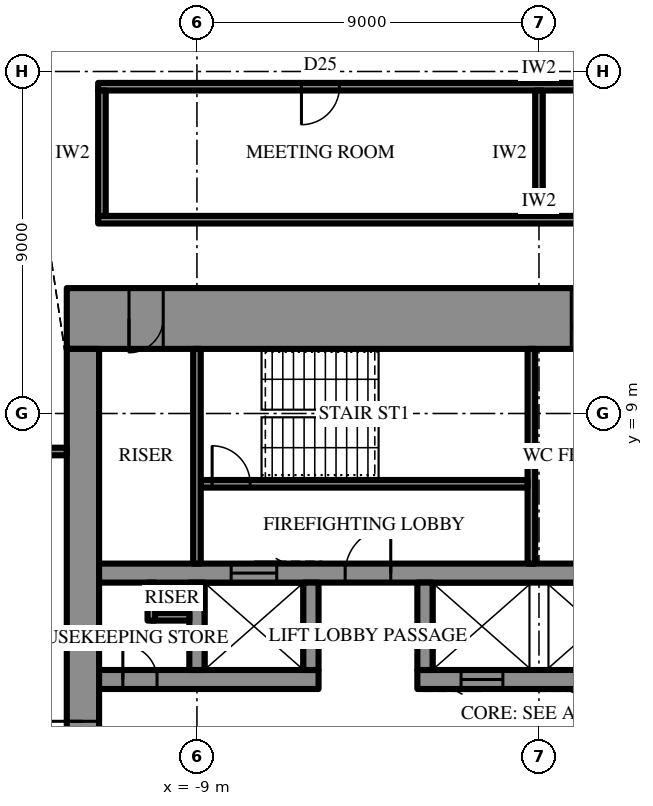
"""IFC4 building model, lengths in metres.
Left out: names, types, materials, properties, quantities, classifications, styles, units other than length and angle.
Written with IfcOpenShell. Run it as: python <this file> out.ifc"""

import sys

from ifc_helpers import new_model, si_unit, direction, frame, frame_2d, origin, place, context, subcontext, project, spatial, rectangle, extrude, element, fill, save


model = new_model("IFC4")
c1 = context("Model", 3, precision=1e-05, world=origin(), true_north=direction((0.0, 1.0)))
c2 = subcontext(c1, "Body", "Model", "MODEL_VIEW")
j1 = project(units=[si_unit("LENGTHUNIT", "METRE"), si_unit("PLANEANGLEUNIT", "RADIAN")], contexts=[c1])
p1 = place(None, origin())
s1 = spatial("IfcSite", under=j1, at=p1, CompositionType="ELEMENT")
p2 = place(p1, origin())
s2 = spatial("IfcBuilding", under=s1, at=p2, CompositionType="ELEMENT")
p3 = place(p2, frame((0.0, 0.0, 345.1)))
s3 = spatial("IfcBuildingStorey", under=s2, at=p3, CompositionType="ELEMENT", Elevation=345.1)
p4 = place(p3, frame((-12.425, 11.5, 0.0), z_axis=(0.0, 0.0, 1.0), x_axis=(1.0, 0.0, 0.0)))
e1 = element("IfcWall", 1, at=p4, inside=s3, PredefinedType="SHEAR", context=c2, shape_type="SweptSolid", body=[
    extrude(rectangle(XDim=24.85, YDim=1.6, at=frame_2d((12.425, 0.0))), origin(), (0.0, 0.0, 1.0), 4.2),
])
p5 = place(p4, frame((13.275, 0.0, 0.0)))
e2 = element("IfcOpeningElement", 2, at=p5, cuts=e1, PredefinedType="OPENING", context=c2, shape_type="SweptSolid", body=[
    extrude(rectangle(XDim=0.9, YDim=2.2, at=frame_2d((0.45, 1.1))), frame((0.0, 0.81, 0.0), z_axis=(0.0, -1.0, 0.0), x_axis=(1.0, 0.0, 0.0)), (0.0, 0.0, 1.0), 1.62),
])
p6 = place(p4, frame((16.275, 0.0, 0.0)))
e3 = element("IfcOpeningElement", 3, at=p6, cuts=e1, PredefinedType="OPENING", context=c2, shape_type="SweptSolid", body=[
    extrude(rectangle(XDim=0.9, YDim=2.2, at=frame_2d((0.45, 1.1))), frame((0.0, 0.81, 0.0), z_axis=(0.0, -1.0, 0.0), x_axis=(1.0, 0.0, 0.0)), (0.0, 0.0, 1.0), 1.62),
])
p7 = place(p4, frame((19.325, 0.0, 0.0)))
e4 = element("IfcOpeningElement", 4, at=p7, cuts=e1, PredefinedType="OPENING", context=c2, shape_type="SweptSolid", body=[
    extrude(rectangle(XDim=1.0, YDim=2.2, at=frame_2d((0.5, 1.1))), frame((0.0, 0.81, 0.0), z_axis=(0.0, -1.0, 0.0), x_axis=(1.0, 0.0, 0.0)), (0.0, 0.0, 1.0), 1.62),
])
p8 = place(p4, frame((1.637, 0.0, 0.0)))
e5 = element("IfcOpeningElement", 5, at=p8, cuts=e1, PredefinedType="OPENING", context=c2, shape_type="SweptSolid", body=[
    extrude(rectangle(XDim=0.9, YDim=2.2, at=frame_2d((0.45, 1.1))), frame((0.0, 0.81, 0.0), z_axis=(0.0, -1.0, 0.0), x_axis=(1.0, 0.0, 0.0)), (0.0, 0.0, 1.0), 1.62),
])
p9 = place(p4, frame((22.312, 0.0, 0.0)))
e6 = element("IfcOpeningElement", 6, at=p9, cuts=e1, PredefinedType="OPENING", context=c2, shape_type="SweptSolid", body=[
    extrude(rectangle(XDim=0.9, YDim=2.2, at=frame_2d((0.45, 1.1))), frame((0.0, 0.81, 0.0), z_axis=(0.0, -1.0, 0.0), x_axis=(1.0, 0.0, 0.0)), (0.0, 0.0, 1.0), 1.62),
])
p10 = place(p3, frame((-12.0, 10.7, 0.0), z_axis=(0.0, 0.0, 1.0), x_axis=(0.0, -1.0, 0.0)))
e7 = element("IfcWall", 7, at=p10, inside=s3, PredefinedType="SHEAR", context=c2, shape_type="SweptSolid", body=[
    extrude(rectangle(XDim=21.4, YDim=0.85, at=frame_2d((10.7, 0.0))), origin(), (0.0, 0.0, 1.0), 4.2),
])
p11 = place(p10, frame((9.8, 0.0, 0.0)))
e8 = element("IfcOpeningElement", 8, at=p11, cuts=e7, PredefinedType="OPENING", context=c2, shape_type="SweptSolid", body=[
    extrude(rectangle(XDim=1.8, YDim=2.4, at=frame_2d((0.9, 1.2))), frame((0.0, 0.435, 0.0), z_axis=(0.0, -1.0, 0.0), x_axis=(1.0, 0.0, 0.0)), (0.0, 0.0, 1.0), 0.87),
])
p12 = place(p3, frame((-11.575, 2.0, 0.0), z_axis=(0.0, 0.0, 1.0), x_axis=(1.0, 0.0, 0.0)))
e9 = element("IfcWall", 9, at=p12, inside=s3, PredefinedType="SHEAR", context=c2, shape_type="SweptSolid", body=[
    extrude(rectangle(XDim=5.775, YDim=0.5, at=frame_2d((2.887, 0.0))), origin(), (0.0, 0.0, 1.0), 4.2),
])
p13 = place(p12, frame((0.625, 0.0, 0.0)))
e10 = element("IfcOpeningElement", 10, at=p13, cuts=e9, PredefinedType="OPENING", context=c2, shape_type="SweptSolid", body=[
    extrude(rectangle(XDim=0.9, YDim=2.2, at=frame_2d((0.45, 1.1))), frame((0.0, 0.26, 0.0), z_axis=(0.0, -1.0, 0.0), x_axis=(1.0, 0.0, 0.0)), (0.0, 0.0, 1.0), 0.52),
])
p14 = place(p3, frame((-3.2, 2.0, 0.0), z_axis=(0.0, 0.0, 1.0), x_axis=(1.0, 0.0, 0.0)))
e11 = element("IfcWall", 11, at=p14, inside=s3, PredefinedType="SHEAR", context=c2, shape_type="SweptSolid", body=[
    extrude(rectangle(XDim=14.775, YDim=0.5, at=frame_2d((7.387, 0.0))), origin(), (0.0, 0.0, 1.0), 4.2),
])
p15 = place(p14, frame((13.25, 0.0, 0.0)))
e12 = element("IfcOpeningElement", 12, at=p15, cuts=e11, PredefinedType="OPENING", context=c2, shape_type="SweptSolid", body=[
    extrude(rectangle(XDim=0.9, YDim=2.2, at=frame_2d((0.45, 1.1))), frame((0.0, 0.26, 0.0), z_axis=(0.0, -1.0, 0.0), x_axis=(1.0, 0.0, 0.0)), (0.0, 0.0, 1.0), 0.52),
])
p16 = place(p14, frame((1.15, 0.0, 0.0)))
e13 = element("IfcOpeningElement", 13, at=p16, cuts=e11, PredefinedType="OPENING", context=c2, shape_type="SweptSolid", body=[
    extrude(rectangle(XDim=1.1, YDim=2.2, at=frame_2d((0.55, 1.1))), frame((0.0, 0.26, 0.0), z_axis=(0.0, -1.0, 0.0), x_axis=(1.0, 0.0, 0.0)), (0.0, 0.0, 1.0), 0.52),
])
p17 = place(p14, frame((4.15, 0.0, 0.0)))
e14 = element("IfcOpeningElement", 14, at=p17, cuts=e11, PredefinedType="OPENING", context=c2, shape_type="SweptSolid", body=[
    extrude(rectangle(XDim=1.1, YDim=2.2, at=frame_2d((0.55, 1.1))), frame((0.0, 0.26, 0.0), z_axis=(0.0, -1.0, 0.0), x_axis=(1.0, 0.0, 0.0)), (0.0, 0.0, 1.0), 0.52),
])
p18 = place(p14, frame((7.15, 0.0, 0.0)))
e15 = element("IfcOpeningElement", 15, at=p18, cuts=e11, PredefinedType="OPENING", context=c2, shape_type="SweptSolid", body=[
    extrude(rectangle(XDim=1.1, YDim=2.2, at=frame_2d((0.55, 1.1))), frame((0.0, 0.26, 0.0), z_axis=(0.0, -1.0, 0.0), x_axis=(1.0, 0.0, 0.0)), (0.0, 0.0, 1.0), 0.52),
])
p19 = place(p14, frame((10.15, 0.0, 0.0)))
e16 = element("IfcOpeningElement", 16, at=p19, cuts=e11, PredefinedType="OPENING", context=c2, shape_type="SweptSolid", body=[
    extrude(rectangle(XDim=1.1, YDim=2.2, at=frame_2d((0.55, 1.1))), frame((0.0, 0.26, 0.0), z_axis=(0.0, -1.0, 0.0), x_axis=(1.0, 0.0, 0.0)), (0.0, 0.0, 1.0), 0.52),
])
p20 = place(p3, frame((-11.575, 4.8, 0.0), z_axis=(0.0, 0.0, 1.0), x_axis=(1.0, 0.0, 0.0)))
e17 = element("IfcWall", 17, at=p20, inside=s3, PredefinedType="SHEAR", context=c2, shape_type="SweptSolid", body=[
    extrude(rectangle(XDim=23.15, YDim=0.5, at=frame_2d((11.575, 0.0))), origin(), (0.0, 0.0, 1.0), 4.2),
])
p21 = place(p20, frame((6.475, 0.0, 0.0)))
e18 = element("IfcOpeningElement", 18, at=p21, cuts=e17, PredefinedType="OPENING", context=c2, shape_type="SweptSolid", body=[
    extrude(rectangle(XDim=1.2, YDim=2.2, at=frame_2d((0.6, 1.1))), frame((0.0, 0.26, 0.0), z_axis=(0.0, -1.0, 0.0), x_axis=(1.0, 0.0, 0.0)), (0.0, 0.0, 1.0), 0.52),
])
p22 = place(p20, frame((3.475, 0.0, 0.0)))
e19 = element("IfcOpeningElement", 19, at=p22, cuts=e17, PredefinedType="OPENING", context=c2, shape_type="SweptSolid", body=[
    extrude(rectangle(XDim=1.2, YDim=2.2, at=frame_2d((0.6, 1.1))), frame((0.0, 0.26, 0.0), z_axis=(0.0, -1.0, 0.0), x_axis=(1.0, 0.0, 0.0)), (0.0, 0.0, 1.0), 0.52),
])
for number, where, z_axis, x_axis in (
    (20, (-9.0, 2.25, 0.0), (0.0, 0.0, 1.0), (0.0, 1.0, 0.0)),
    (21, (-6.0, 2.25, 0.0), (0.0, 0.0, 1.0), (0.0, 1.0, 0.0)),
    (22, (-3.0, 2.25, 0.0), (0.0, 0.0, 1.0), (0.0, 1.0, 0.0)),
):
    element("IfcWall", number, at=place(p3, frame(where, z_axis=z_axis, x_axis=x_axis)), inside=s3, PredefinedType="SHEAR", context=c2, shape_type="SweptSolid", body=[
        extrude(rectangle(XDim=2.3, YDim=0.4, at=frame_2d((1.15, 0.0))), origin(), (0.0, 0.0, 1.0), 4.2),
    ])
p23 = place(p3, frame((-0.2, 5.05, 0.0), z_axis=(0.0, 0.0, 1.0), x_axis=(0.0, 1.0, 0.0)))
e23 = element("IfcWall", 23, at=p23, inside=s3, PredefinedType="SHEAR", context=c2, shape_type="SweptSolid", body=[
    extrude(rectangle(XDim=5.65, YDim=0.2, at=frame_2d((2.825, 0.0))), origin(), (0.0, 0.0, 1.0), 4.2),
])
p24 = place(p3, frame((-8.9, 7.15, 0.0), z_axis=(0.0, 0.0, 1.0), x_axis=(1.0, 0.0, 0.0)))
e24 = element("IfcWall", 24, at=p24, inside=s3, PredefinedType="SHEAR", context=c2, shape_type="SweptSolid", body=[
    extrude(rectangle(XDim=8.6, YDim=0.2, at=frame_2d((4.3, 0.0))), origin(), (0.0, 0.0, 1.0), 4.2),
])
p25 = place(p24, frame((0.3, 0.0, 0.0)))
e25 = element("IfcOpeningElement", 25, at=p25, cuts=e24, PredefinedType="OPENING", context=c2, shape_type="SweptSolid", body=[
    extrude(rectangle(XDim=1.0, YDim=2.2, at=frame_2d((0.5, 1.1))), frame((0.0, 0.11, 0.0), z_axis=(0.0, -1.0, 0.0), x_axis=(1.0, 0.0, 0.0)), (0.0, 0.0, 1.0), 0.22),
])
p26 = place(p3, frame((-9.0, 5.05, 0.0), z_axis=(0.0, 0.0, 1.0), x_axis=(0.0, 1.0, 0.0)))
e26 = element("IfcWall", 26, at=p26, inside=s3, PredefinedType="PARTITIONING", context=c2, shape_type="SweptSolid", body=[
    extrude(rectangle(XDim=5.65, YDim=0.2, at=frame_2d((2.825, 0.0))), origin(), (0.0, 0.0, 1.0), 4.0),
])
for number, where, z_axis, x_axis in (
    (27, (-10.2, 3.65, 0.0), (0.0, 0.0, 1.0), (1.0, 0.0, 0.0)),
    (28, (-10.2, 3.55, 0.0), (0.0, 0.0, 1.0), (0.0, 1.0, 0.0)),
):
    element("IfcWall", number, at=place(p3, frame(where, z_axis=z_axis, x_axis=x_axis)), inside=s3, PredefinedType="PARTITIONING", context=c2, shape_type="SweptSolid", body=[
        extrude(rectangle(XDim=1.0, YDim=0.2, at=frame_2d((0.5, 0.0))), origin(), (0.0, 0.0, 1.0), 4.0),
    ])
p27 = place(p3, frame((-11.6, 14.1, 0.0), z_axis=(0.0, 0.0, 1.0), x_axis=(1.0, 0.0, 0.0)))
e29 = element("IfcWall", 29, at=p27, inside=s3, PredefinedType="PARTITIONING", context=c2, shape_type="SweptSolid", body=[
    extrude(rectangle(XDim=23.2, YDim=0.2, at=frame_2d((11.6, 0.0))), origin(), (0.0, 0.0, 1.0), 4.0),
])
p28 = place(p3, frame((-11.6, 17.6, 0.0), z_axis=(0.0, 0.0, 1.0), x_axis=(1.0, 0.0, 0.0)))
e30 = element("IfcWall", 30, at=p28, inside=s3, PredefinedType="PARTITIONING", context=c2, shape_type="SweptSolid", body=[
    extrude(rectangle(XDim=23.2, YDim=0.2, at=frame_2d((11.6, 0.0))), origin(), (0.0, 0.0, 1.0), 4.0),
])
p29 = place(p28, frame((5.35, 0.0, 0.0)))
e31 = element("IfcOpeningElement", 31, at=p29, cuts=e30, PredefinedType="OPENING", context=c2, shape_type="SweptSolid", body=[
    extrude(rectangle(XDim=1.0, YDim=2.2, at=frame_2d((0.5, 1.1))), frame((0.0, 0.11, 0.0), z_axis=(0.0, -1.0, 0.0), x_axis=(1.0, 0.0, 0.0)), (0.0, 0.0, 1.0), 0.22),
])
p30 = place(p28, frame((16.85, 0.0, 0.0)))
e32 = element("IfcOpeningElement", 32, at=p30, cuts=e30, PredefinedType="OPENING", context=c2, shape_type="SweptSolid", body=[
    extrude(rectangle(XDim=1.0, YDim=2.2, at=frame_2d((0.5, 1.1))), frame((0.0, 0.11, 0.0), z_axis=(0.0, -1.0, 0.0), x_axis=(1.0, 0.0, 0.0)), (0.0, 0.0, 1.0), 0.22),
])
p31 = place(p3, frame((-11.5, 14.2, 0.0), z_axis=(0.0, 0.0, 1.0), x_axis=(0.0, 1.0, 0.0)))
e33 = element("IfcWall", 33, at=p31, inside=s3, PredefinedType="PARTITIONING", context=c2, shape_type="SweptSolid", body=[
    extrude(rectangle(XDim=3.3, YDim=0.2, at=frame_2d((1.65, 0.0))), origin(), (0.0, 0.0, 1.0), 4.0),
])
p32 = place(p3, frame((0.0, 14.2, 0.0), z_axis=(0.0, 0.0, 1.0), x_axis=(0.0, 1.0, 0.0)))
e34 = element("IfcWall", 34, at=p32, inside=s3, PredefinedType="PARTITIONING", context=c2, shape_type="SweptSolid", body=[
    extrude(rectangle(XDim=3.3, YDim=0.2, at=frame_2d((1.65, 0.0))), origin(), (0.0, 0.0, 1.0), 2.992),
])
p33 = place(p3, frame((-12.425, 8.0, 0.0), z_axis=(0.0, 0.0, 1.0), x_axis=(-1.0, 0.0, 0.0)))
e35 = element("IfcWall", 35, at=p33, inside=s3, PredefinedType="PARTITIONING", context=c2, shape_type="SweptSolid", body=[
    extrude(rectangle(XDim=13.59, YDim=0.2, at=frame_2d((6.795, 0.0))), origin(), (0.0, 0.0, 1.0), 4.0),
])
p34 = place(p33, frame((0.859, 0.0, 0.0)))
e36 = element("IfcOpeningElement", 36, at=p34, cuts=e35, PredefinedType="OPENING", context=c2, shape_type="SweptSolid", body=[
    extrude(rectangle(XDim=1.0, YDim=2.2, at=frame_2d((0.5, 1.1))), frame((0.0, 0.11, 0.0), z_axis=(0.0, -1.0, 0.0), x_axis=(1.0, 0.0, 0.0)), (0.0, 0.0, 1.0), 0.22),
])
p35 = place(p11, frame((1.8, 0.0, 0.0), z_axis=(0.0, 0.0, 1.0), x_axis=(-1.0, 0.0, 0.0)))
e37 = element("IfcDoor", 37, at=p35, inside=s3, OperationType="DOUBLE_DOOR_SINGLE_SWING", PredefinedType="DOOR", context=c2, shape_type="SweptSolid", body=[
    extrude(rectangle(XDim=1.8, YDim=2.4, at=frame_2d((0.9, 1.2))), frame((0.0, 0.025, 0.0), z_axis=(0.0, -1.0, 0.0), x_axis=(1.0, 0.0, 0.0)), (0.0, 0.0, 1.0), 0.05),
])
fill(e8, e37)
p36 = place(p21, origin())
e38 = element("IfcDoor", 38, at=p36, inside=s3, OperationType="SINGLE_SWING_LEFT", PredefinedType="DOOR", context=c2, shape_type="SweptSolid", body=[
    extrude(rectangle(XDim=1.2, YDim=2.2, at=frame_2d((0.6, 1.1))), frame((0.0, 0.025, 0.0), z_axis=(0.0, -1.0, 0.0), x_axis=(1.0, 0.0, 0.0)), (0.0, 0.0, 1.0), 0.05),
])
fill(e18, e38)
p37 = place(p25, origin())
e39 = element("IfcDoor", 39, at=p37, inside=s3, OperationType="SINGLE_SWING_RIGHT", PredefinedType="DOOR", context=c2, shape_type="SweptSolid", body=[
    extrude(rectangle(XDim=1.0, YDim=2.2, at=frame_2d((0.5, 1.1))), frame((0.0, 0.025, 0.0), z_axis=(0.0, -1.0, 0.0), x_axis=(1.0, 0.0, 0.0)), (0.0, 0.0, 1.0), 0.05),
])
fill(e25, e39)
p38 = place(p5, frame((0.9, 0.0, 0.0), z_axis=(0.0, 0.0, 1.0), x_axis=(-1.0, 0.0, 0.0)))
e40 = element("IfcDoor", 40, at=p38, inside=s3, OperationType="SINGLE_SWING_RIGHT", PredefinedType="DOOR", context=c2, shape_type="SweptSolid", body=[
    extrude(rectangle(XDim=0.9, YDim=2.2, at=frame_2d((0.45, 1.1))), frame((0.0, 0.025, 0.0), z_axis=(0.0, -1.0, 0.0), x_axis=(1.0, 0.0, 0.0)), (0.0, 0.0, 1.0), 0.05),
])
fill(e2, e40)
p39 = place(p8, frame((0.9, 0.0, 0.0), z_axis=(0.0, 0.0, 1.0), x_axis=(-1.0, 0.0, 0.0)))
e41 = element("IfcDoor", 41, at=p39, inside=s3, OperationType="SINGLE_SWING_LEFT", PredefinedType="DOOR", context=c2, shape_type="SweptSolid", body=[
    extrude(rectangle(XDim=0.9, YDim=2.2, at=frame_2d((0.45, 1.1))), frame((0.0, 0.025, 0.0), z_axis=(0.0, -1.0, 0.0), x_axis=(1.0, 0.0, 0.0)), (0.0, 0.0, 1.0), 0.05),
])
fill(e5, e41)
p40 = place(p13, origin())
e42 = element("IfcDoor", 42, at=p40, inside=s3, OperationType="SINGLE_SWING_RIGHT", PredefinedType="DOOR", context=c2, shape_type="SweptSolid", body=[
    extrude(rectangle(XDim=0.9, YDim=2.2, at=frame_2d((0.45, 1.1))), frame((0.0, 0.025, 0.0), z_axis=(0.0, -1.0, 0.0), x_axis=(1.0, 0.0, 0.0)), (0.0, 0.0, 1.0), 0.05),
])
fill(e10, e42)
p41 = place(p22, origin())
e43 = element("IfcDoor", 43, at=p41, inside=s3, OperationType="SLIDING_TO_LEFT", PredefinedType="DOOR", context=c2, shape_type="SweptSolid", body=[
    extrude(rectangle(XDim=1.2, YDim=2.2, at=frame_2d((0.6, 1.1))), frame((0.0, 0.025, 0.0), z_axis=(0.0, -1.0, 0.0), x_axis=(1.0, 0.0, 0.0)), (0.0, 0.0, 1.0), 0.05),
])
fill(e19, e43)
p42 = place(p16, frame((1.1, 0.0, 0.0), z_axis=(0.0, 0.0, 1.0), x_axis=(-1.0, 0.0, 0.0)))
e44 = element("IfcDoor", 44, at=p42, inside=s3, OperationType="SLIDING_TO_LEFT", PredefinedType="DOOR", context=c2, shape_type="SweptSolid", body=[
    extrude(rectangle(XDim=1.1, YDim=2.2, at=frame_2d((0.55, 1.1))), frame((0.0, 0.025, 0.0), z_axis=(0.0, -1.0, 0.0), x_axis=(1.0, 0.0, 0.0)), (0.0, 0.0, 1.0), 0.05),
])
fill(e13, e44)
p43 = place(p29, frame((1.0, 0.0, 0.0), z_axis=(0.0, 0.0, 1.0), x_axis=(-1.0, 0.0, 0.0)))
e45 = element("IfcDoor", 45, at=p43, inside=s3, OperationType="SINGLE_SWING_LEFT", PredefinedType="DOOR", context=c2, shape_type="SweptSolid", body=[
    extrude(rectangle(XDim=1.0, YDim=2.2, at=frame_2d((0.5, 1.1))), frame((0.0, 0.025, 0.0), z_axis=(0.0, -1.0, 0.0), x_axis=(1.0, 0.0, 0.0)), (0.0, 0.0, 1.0), 0.05),
])
fill(e31, e45)
save(model, sys.argv[1])
